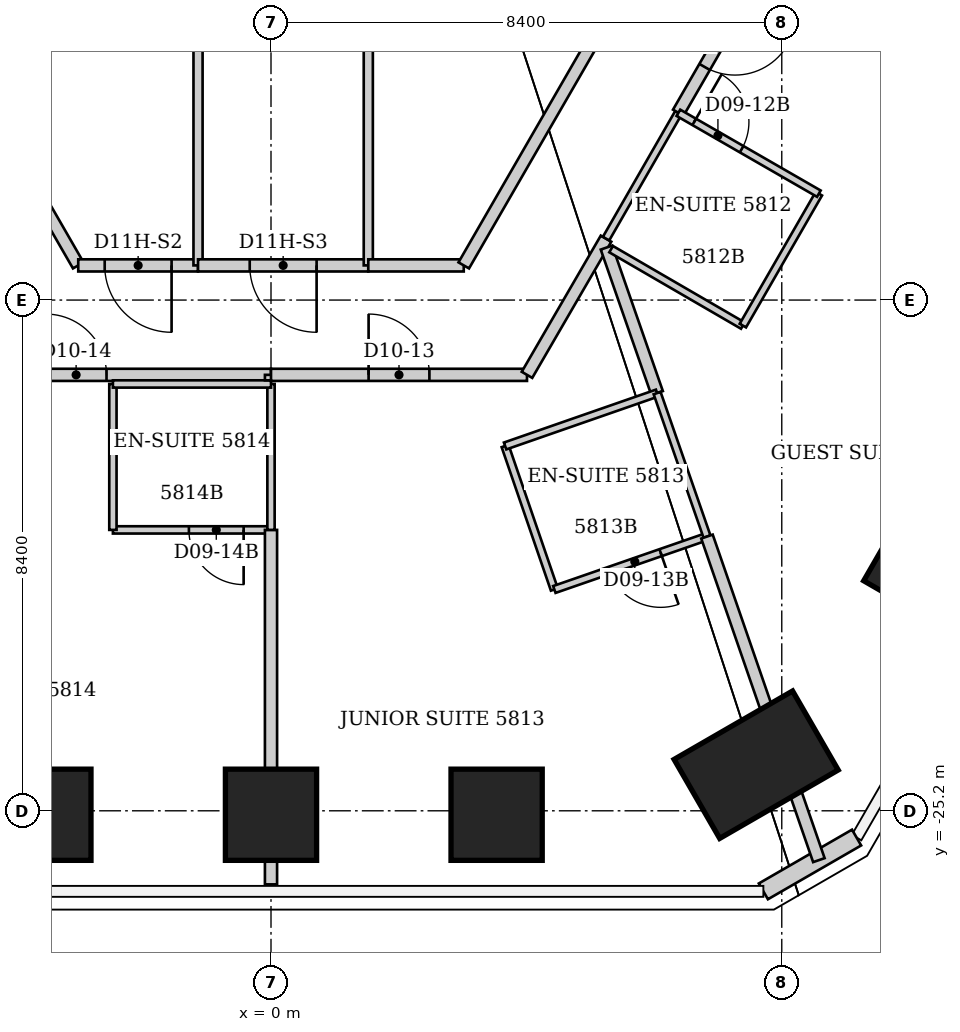
"""IFC4 building model, lengths in metres.
Left out: names, types, materials, properties, quantities, classifications, styles, units other than length and angle.
Written with IfcOpenShell. Run it as: python <this file> out.ifc"""

import sys

from ifc_helpers import new_model, si_unit, direction, frame, frame_2d, origin, origin_2d, place, context, subcontext, project, spatial, rectangle, extrude, element, fill, save


model = new_model("IFC4")
c1 = context("Model", 3, precision=1e-05, world=origin(), true_north=direction((0.0, 1.0)))
c2 = subcontext(c1, "Body", "Model", "MODEL_VIEW")
j1 = project(units=[si_unit("LENGTHUNIT", "METRE"), si_unit("PLANEANGLEUNIT", "RADIAN")], contexts=[c1])
p1 = place(None, origin())
s1 = spatial("IfcSite", under=j1, at=p1, CompositionType="ELEMENT")
p2 = place(p1, origin())
s2 = spatial("IfcBuilding", under=s1, at=p2, CompositionType="ELEMENT")
p3 = place(p2, frame((0.0, 0.0, 232.6)))
s3 = spatial("IfcBuildingStorey", under=s2, at=p3, CompositionType="ELEMENT", Elevation=232.6)
p4 = place(p3, frame((10.772, -21.142, -0.068), z_axis=(-0.029544009484, 0.057954133742, 0.997881991964), x_axis=(0.86581251094, -0.497389360855, 0.054520818106)))
e1 = element("IfcColumn", 1, at=p4, inside=s3, PredefinedType="COLUMN", context=c2, shape_type="SweptSolid", body=[
    extrude(rectangle(XDim=1.5, YDim=1.5, at=origin_2d()), origin(), (0.0, 0.0, 1.0), 3.876),
])
p5 = place(p3, frame((7.979, -24.442, -0.069), z_axis=(-0.022031779276, 0.067543140467, 0.997473069751), x_axis=(0.499490056896, -0.86352686909, 0.069505607122)))
e2 = element("IfcColumn", 2, at=p5, inside=s3, PredefinedType="COLUMN", context=c2, shape_type="SweptSolid", body=[
    extrude(rectangle(XDim=1.5, YDim=2.25, at=origin_2d()), origin(), (0.0, 0.0, 1.0), 3.878),
])
p6 = place(p3, frame((3.71, -25.265, -0.059), z_axis=(-0.010036196813, 0.068170393449, 0.997623211544), x_axis=(-0.000328953471, -0.99767362936, 0.068170529333)))
e3 = element("IfcColumn", 3, at=p6, inside=s3, PredefinedType="COLUMN", context=c2, shape_type="SweptSolid", body=[
    extrude(rectangle(XDim=1.5, YDim=1.5, at=origin_2d()), origin(), (0.0, 0.0, 1.0), 3.868),
])
p7 = place(p3, frame((0.0, -25.265, -0.051), z_axis=(0.0, 0.068181275472, 0.997672949255), x_axis=(0.0, -0.997672949255, 0.068181275472)))
e4 = element("IfcColumn", 4, at=p7, inside=s3, PredefinedType="COLUMN", context=c2, shape_type="SweptSolid", body=[
    extrude(rectangle(XDim=1.5, YDim=1.5, at=origin_2d()), origin(), (0.0, 0.0, 1.0), 3.86),
])
p8 = place(p3, frame((-3.71, -25.265, -0.059), z_axis=(0.010036196813, 0.068170393449, 0.997623211544), x_axis=(0.000328953471, -0.99767362936, 0.068170529333)))
e5 = element("IfcColumn", 5, at=p8, inside=s3, PredefinedType="COLUMN", context=c2, shape_type="SweptSolid", body=[
    extrude(rectangle(XDim=1.5, YDim=1.5, at=origin_2d()), origin(), (0.0, 0.0, 1.0), 3.868),
])
p9 = place(p3, frame((9.63, -25.64, 0.0), z_axis=(0.0, 0.0, 1.0), x_axis=(-0.866036293601, -0.499981137809, 0.0)))
e6 = element("IfcWall", 6, at=p9, inside=s3, PredefinedType="SOLIDWALL", context=c2, shape_type="SweptSolid", body=[
    extrude(rectangle(XDim=1.77, YDim=0.3, at=frame_2d((0.885, 0.0))), origin(), (0.0, 0.0, 1.0), 3.64),
])
p10 = place(p3, frame((-4.21, -18.03, 0.0), z_axis=(0.0, 0.0, 1.0), x_axis=(1.0, 0.0, 0.0)))
e7 = element("IfcWall", 7, at=p10, inside=s3, PredefinedType="PARTITIONING", context=c2, shape_type="SweptSolid", body=[
    extrude(rectangle(XDim=4.21, YDim=0.2, at=frame_2d((2.105, 0.0))), origin(), (0.0, 0.0, 1.0), 3.64),
])
p11 = place(p10, frame((0.505, 0.0, 0.0)))
e8 = element("IfcOpeningElement", 8, at=p11, cuts=e7, PredefinedType="OPENING", context=c2, shape_type="SweptSolid", body=[
    extrude(rectangle(XDim=1.0, YDim=2.13, at=frame_2d((0.5, 1.065))), frame((0.0, 0.1, 0.0), z_axis=(0.0, -1.0, 0.0), x_axis=(1.0, 0.0, 0.0)), (0.0, 0.0, 1.0), 0.2),
])
p12 = place(p3, frame((-3.17, -16.23, 0.0), z_axis=(0.0, 0.0, 1.0), x_axis=(-0.499425709803, 0.866356716594, 0.0)))
e9 = element("IfcWall", 9, at=p12, inside=s3, PredefinedType="PARTITIONING", context=c2, shape_type="SweptSolid", body=[
    extrude(rectangle(XDim=1.662, YDim=0.2, at=frame_2d((0.831, 0.0))), origin(), (0.0, 0.0, 1.0), 3.64),
])
p13 = place(p3, frame((-2.6, -20.58, 0.0), z_axis=(0.0, 0.0, 1.0), x_axis=(1.0, 0.0, 0.0)))
e10 = element("IfcWall", 10, at=p13, inside=s3, PredefinedType="PARTITIONING", context=c2, shape_type="SweptSolid", body=[
    extrude(rectangle(XDim=2.6, YDim=0.12, at=frame_2d((1.3, 0.0))), origin(), (0.0, 0.0, 1.0), 3.64),
])
p14 = place(p13, frame((1.25, 0.0, 0.0)))
e11 = element("IfcOpeningElement", 11, at=p14, cuts=e10, PredefinedType="OPENING", context=c2, shape_type="SweptSolid", body=[
    extrude(rectangle(XDim=0.9, YDim=2.03, at=frame_2d((0.45, 1.015))), frame((0.0, 0.06, 0.0), z_axis=(0.0, -1.0, 0.0), x_axis=(1.0, 0.0, 0.0)), (0.0, 0.0, 1.0), 0.12),
])
p15 = place(p3, frame((-2.6, -18.18, 0.0), z_axis=(0.0, 0.0, 1.0), x_axis=(0.0, -1.0, 0.0)))
e12 = element("IfcWall", 12, at=p15, inside=s3, PredefinedType="PARTITIONING", context=c2, shape_type="SweptSolid", body=[
    extrude(rectangle(XDim=2.4, YDim=0.12, at=frame_2d((1.2, 0.0))), origin(), (0.0, 0.0, 1.0), 3.64),
])
p16 = place(p3, frame((-1.2, -16.23, 0.0), z_axis=(0.0, 0.0, 1.0), x_axis=(-1.0, 0.0, 0.0)))
e13 = element("IfcWall", 13, at=p16, inside=s3, PredefinedType="PARTITIONING", context=c2, shape_type="SweptSolid", body=[
    extrude(rectangle(XDim=1.97, YDim=0.2, at=frame_2d((0.985, 0.0))), origin(), (0.0, 0.0, 1.0), 3.64),
])
p17 = place(p16, frame((0.435, 0.0, 0.0)))
e14 = element("IfcOpeningElement", 14, at=p17, cuts=e13, PredefinedType="OPENING", context=c2, shape_type="SweptSolid", body=[
    extrude(rectangle(XDim=1.1, YDim=2.2, at=frame_2d((0.55, 1.1))), frame((0.0, 0.1, 0.0), z_axis=(0.0, -1.0, 0.0), x_axis=(1.0, 0.0, 0.0)), (0.0, 0.0, 1.0), 0.2),
])
p18 = place(p3, frame((-1.2, -7.1, 0.0), z_axis=(0.0, 0.0, 1.0), x_axis=(0.0, -1.0, 0.0)))
e15 = element("IfcWall", 15, at=p18, inside=s3, PredefinedType="PARTITIONING", context=c2, shape_type="SweptSolid", body=[
    extrude(rectangle(XDim=9.13, YDim=0.15, at=frame_2d((4.565, 0.0))), origin(), (0.0, 0.0, 1.0), 3.64),
])
p19 = place(p3, frame((0.0, -26.41, 0.0), z_axis=(0.0, 0.0, 1.0), x_axis=(0.0, 1.0, 0.0)))
e16 = element("IfcWall", 16, at=p19, inside=s3, PredefinedType="PARTITIONING", context=c2, shape_type="SweptSolid", body=[
    extrude(rectangle(XDim=5.83, YDim=0.2, at=frame_2d((2.915, 0.0))), origin(), (0.0, 0.0, 1.0), 2.726),
])
p20 = place(p3, frame((0.0, -20.58, 0.0), z_axis=(0.0, 0.0, 1.0), x_axis=(0.0, 1.0, 0.0)))
e17 = element("IfcWall", 17, at=p20, inside=s3, PredefinedType="PARTITIONING", context=c2, shape_type="SweptSolid", body=[
    extrude(rectangle(XDim=2.4, YDim=0.12, at=frame_2d((1.2, 0.0))), origin(), (0.0, 0.0, 1.0), 2.726),
])
p21 = place(p3, frame((0.0, -18.18, 0.0), z_axis=(0.0, 0.0, 1.0), x_axis=(-1.0, 0.0, 0.0)))
e18 = element("IfcWall", 18, at=p21, inside=s3, PredefinedType="PARTITIONING", context=c2, shape_type="SweptSolid", body=[
    extrude(rectangle(XDim=2.6, YDim=0.12, at=frame_2d((1.3, 0.0))), origin(), (0.0, 0.0, 1.0), 3.64),
])
p22 = place(p3, frame((0.0, -18.12, 0.0), z_axis=(0.0, 0.0, 1.0), x_axis=(0.0, 1.0, 0.0)))
e19 = element("IfcWall", 19, at=p22, inside=s3, PredefinedType="PARTITIONING", context=c2, shape_type="SweptSolid", body=[
    extrude(rectangle(XDim=0.09, YDim=0.2, at=frame_2d((0.045, 0.0))), origin(), (0.0, 0.0, 1.0), 3.64),
])
p23 = place(p3, frame((0.0, -18.03, 0.0), z_axis=(0.0, 0.0, 1.0), x_axis=(1.0, 0.0, 0.0)))
e20 = element("IfcWall", 20, at=p23, inside=s3, PredefinedType="PARTITIONING", context=c2, shape_type="SweptSolid", body=[
    extrude(rectangle(XDim=4.21, YDim=0.2, at=frame_2d((2.105, 0.0))), origin(), (0.0, 0.0, 1.0), 3.64),
])
p24 = place(p23, frame((1.605, 0.0, 0.0)))
e21 = element("IfcOpeningElement", 21, at=p24, cuts=e20, PredefinedType="OPENING", context=c2, shape_type="SweptSolid", body=[
    extrude(rectangle(XDim=1.0, YDim=2.13, at=frame_2d((0.5, 1.065))), frame((0.0, 0.1, 0.0), z_axis=(0.0, -1.0, 0.0), x_axis=(1.0, 0.0, 0.0)), (0.0, 0.0, 1.0), 0.2),
])
p25 = place(p3, frame((1.6, -16.23, 0.0), z_axis=(0.0, 0.0, 1.0), x_axis=(-1.0, 0.0, 0.0)))
e22 = element("IfcWall", 22, at=p25, inside=s3, PredefinedType="PARTITIONING", context=c2, shape_type="SweptSolid", body=[
    extrude(rectangle(XDim=2.8, YDim=0.2, at=frame_2d((1.4, 0.0))), origin(), (0.0, 0.0, 1.0), 3.64),
])
p26 = place(p25, frame((0.85, 0.0, 0.0)))
e23 = element("IfcOpeningElement", 23, at=p26, cuts=e22, PredefinedType="OPENING", context=c2, shape_type="SweptSolid", body=[
    extrude(rectangle(XDim=1.1, YDim=2.2, at=frame_2d((0.55, 1.1))), frame((0.0, 0.1, 0.0), z_axis=(0.0, -1.0, 0.0), x_axis=(1.0, 0.0, 0.0)), (0.0, 0.0, 1.0), 0.2),
])
p27 = place(p3, frame((1.6, -7.1, 0.0), z_axis=(0.0, 0.0, 1.0), x_axis=(0.0, -1.0, 0.0)))
e24 = element("IfcWall", 24, at=p27, inside=s3, PredefinedType="PARTITIONING", context=c2, shape_type="SweptSolid", body=[
    extrude(rectangle(XDim=9.13, YDim=0.15, at=frame_2d((4.565, 0.0))), origin(), (0.0, 0.0, 1.0), 3.64),
])
p28 = place(p3, frame((3.17, -16.23, 0.0), z_axis=(0.0, 0.0, 1.0), x_axis=(-1.0, 0.0, 0.0)))
e25 = element("IfcWall", 25, at=p28, inside=s3, PredefinedType="PARTITIONING", context=c2, shape_type="SweptSolid", body=[
    extrude(rectangle(XDim=1.57, YDim=0.2, at=frame_2d((0.785, 0.0))), origin(), (0.0, 0.0, 1.0), 3.64),
])
p29 = place(p3, frame((3.85, -19.2, 0.0), z_axis=(0.0, 0.0, 1.0), x_axis=(0.324551952924, -0.945867871245, 0.0)))
e26 = element("IfcWall", 26, at=p29, inside=s3, PredefinedType="PARTITIONING", context=c2, shape_type="SweptSolid", body=[
    extrude(rectangle(XDim=2.495, YDim=0.12, at=frame_2d((1.248, 0.0))), origin(), (0.0, 0.0, 1.0), 3.64),
])
p30 = place(p3, frame((4.66, -21.56, 0.0), z_axis=(0.0, 0.0, 1.0), x_axis=(0.944838473769, 0.327536652126, 0.0)))
e27 = element("IfcWall", 27, at=p30, inside=s3, PredefinedType="PARTITIONING", context=c2, shape_type="SweptSolid", body=[
    extrude(rectangle(XDim=2.656, YDim=0.12, at=frame_2d((1.328, 0.0))), origin(), (0.0, 0.0, 1.0), 3.64),
])
p31 = place(p30, frame((0.95, 0.0, 0.0)))
e28 = element("IfcOpeningElement", 28, at=p31, cuts=e27, PredefinedType="OPENING", context=c2, shape_type="SweptSolid", body=[
    extrude(rectangle(XDim=0.9, YDim=2.03, at=frame_2d((0.45, 1.015))), frame((0.0, 0.06, 0.0), z_axis=(0.0, -1.0, 0.0), x_axis=(1.0, 0.0, 0.0)), (0.0, 0.0, 1.0), 0.12),
])
p32 = place(p3, frame((5.51, -15.79, 0.0), z_axis=(0.0, 0.0, 1.0), x_axis=(-0.501964949025, -0.864887963814, 0.0)))
e29 = element("IfcWall", 29, at=p32, inside=s3, PredefinedType="PARTITIONING", context=c2, shape_type="SweptSolid", body=[
    extrude(rectangle(XDim=2.59, YDim=0.2, at=frame_2d((1.295, 0.0))), origin(), (0.0, 0.0, 1.0), 3.64),
])
p33 = place(p3, frame((5.51, -15.79, 0.0), z_axis=(0.0, 0.0, 1.0), x_axis=(0.49836161924, 0.866969259241, 0.0)))
e30 = element("IfcWall", 30, at=p33, inside=s3, PredefinedType="PARTITIONING", context=c2, shape_type="SweptSolid", body=[
    extrude(rectangle(XDim=2.388, YDim=0.12, at=frame_2d((1.194, 0.0))), origin(), (0.0, 0.0, 1.0), 3.64),
])
p34 = place(p3, frame((5.517, -15.937, 0.0), z_axis=(0.0, 0.0, 1.0), x_axis=(0.328714924291, -0.944429191919, 0.0)))
e31 = element("IfcWall", 31, at=p34, inside=s3, PredefinedType="PARTITIONING", context=c2, shape_type="SweptSolid", body=[
    extrude(rectangle(XDim=2.534, YDim=0.2, at=frame_2d((1.267, 0.0))), origin(), (0.0, 0.0, 1.0), 3.64),
])
p35 = place(p3, frame((5.594, -15.963, 0.0), z_axis=(0.0, 0.0, 1.0), x_axis=(0.864900876675, -0.501942699445, 0.0)))
e32 = element("IfcWall", 32, at=p35, inside=s3, PredefinedType="PARTITIONING", context=c2, shape_type="SweptSolid", body=[
    extrude(rectangle(XDim=2.505, YDim=0.12, at=frame_2d((1.252, 0.0))), origin(), (0.0, 0.0, 1.0), 3.038),
])
p36 = place(p3, frame((6.35, -18.33, 0.0), z_axis=(0.0, 0.0, 1.0), x_axis=(-0.944470666048, -0.328595740956, 0.0)))
e33 = element("IfcWall", 33, at=p36, inside=s3, PredefinedType="PARTITIONING", context=c2, shape_type="SweptSolid", body=[
    extrude(rectangle(XDim=2.647, YDim=0.12, at=frame_2d((1.324, 0.0))), origin(), (0.0, 0.0, 1.0), 3.64),
])
p37 = place(p3, frame((6.35, -18.33, 0.0), z_axis=(0.0, 0.0, 1.0), x_axis=(0.328164304993, -0.944620658745, 0.0)))
e34 = element("IfcWall", 34, at=p37, inside=s3, PredefinedType="PARTITIONING", context=c2, shape_type="SweptSolid", body=[
    extrude(rectangle(XDim=2.498, YDim=0.12, at=frame_2d((1.249, 0.0))), origin(), (0.0, 0.0, 1.0), 3.64),
])
p38 = place(p3, frame((7.17, -20.69, 0.0), z_axis=(0.0, 0.0, 1.0), x_axis=(0.326821657676, -0.945086029985, 0.0)))
e35 = element("IfcWall", 35, at=p38, inside=s3, PredefinedType="PARTITIONING", context=c2, shape_type="SweptSolid", body=[
    extrude(rectangle(XDim=5.631, YDim=0.2, at=frame_2d((2.815, 0.0))), origin(), (0.0, 0.0, 1.0), 3.64),
])
p39 = place(p3, frame((7.76, -17.22, 0.0), z_axis=(0.0, 0.0, 1.0), x_axis=(0.499159685399, 0.866510016372, 0.0)))
e36 = element("IfcWall", 36, at=p39, inside=s3, PredefinedType="PARTITIONING", context=c2, shape_type="SweptSolid", body=[
    extrude(rectangle(XDim=2.504, YDim=0.12, at=frame_2d((1.252, 0.0))), origin(), (0.0, 0.0, 1.0), 3.64),
])
p40 = place(p3, frame((8.065, -11.347, 0.0), z_axis=(0.0, 0.0, 1.0), x_axis=(-0.499611785355, -0.866249423627, 0.0)))
e37 = element("IfcWall", 37, at=p40, inside=s3, PredefinedType="PARTITIONING", context=c2, shape_type="SweptSolid", body=[
    extrude(rectangle(XDim=2.738, YDim=0.2, at=frame_2d((1.369, 0.0))), origin(), (0.0, 0.0, 1.0), 3.64),
])
p41 = place(p40, frame((0.869, 0.0, 0.0)))
e38 = element("IfcOpeningElement", 38, at=p41, cuts=e37, PredefinedType="OPENING", context=c2, shape_type="SweptSolid", body=[
    extrude(rectangle(XDim=1.0, YDim=2.13, at=frame_2d((0.5, 1.065))), frame((0.0, 0.1, 0.0), z_axis=(0.0, -1.0, 0.0), x_axis=(1.0, 0.0, 0.0)), (0.0, 0.0, 1.0), 0.2),
])
p42 = place(p3, frame((8.07, -11.35, 0.0), z_axis=(0.0, 0.0, 1.0), x_axis=(0.865006586495, -0.501760505939, 0.0)))
e39 = element("IfcWall", 39, at=p42, inside=s3, PredefinedType="PARTITIONING", context=c2, shape_type="SweptSolid", body=[
    extrude(rectangle(XDim=2.67, YDim=0.12, at=frame_2d((1.335, 0.0))), origin(), (0.0, 0.0, 1.0), 3.64),
])
p43 = place(p3, frame((8.41, -7.15, 0.0), z_axis=(0.0, 0.0, 1.0), x_axis=(-0.499828628176, -0.866124322748, 0.0)))
e40 = element("IfcWall", 40, at=p43, inside=s3, PredefinedType="PARTITIONING", context=c2, shape_type="SweptSolid", body=[
    extrude(rectangle(XDim=10.484, YDim=0.2, at=frame_2d((5.242, 0.0))), origin(), (0.0, 0.0, 1.0), 3.64),
])
p44 = place(p43, frame((4.692, 0.0, 0.0)))
e41 = element("IfcOpeningElement", 41, at=p44, cuts=e40, PredefinedType="OPENING", context=c2, shape_type="SweptSolid", body=[
    extrude(rectangle(XDim=1.1, YDim=2.2, at=frame_2d((0.55, 1.1))), frame((0.0, 0.1, 0.0), z_axis=(0.0, -1.0, 0.0), x_axis=(1.0, 0.0, 0.0)), (0.0, 0.0, 1.0), 0.2),
])
p45 = place(p3, frame((9.01, -15.05, 0.0), z_axis=(0.0, 0.0, 1.0), x_axis=(-0.866615255992, 0.498976951453, 0.0)))
e42 = element("IfcWall", 42, at=p45, inside=s3, PredefinedType="PARTITIONING", context=c2, shape_type="SweptSolid", body=[
    extrude(rectangle(XDim=2.666, YDim=0.12, at=frame_2d((1.333, 0.0))), origin(), (0.0, 0.0, 1.0), 3.64),
])
p46 = place(p45, frame((1.466, 0.0, 0.0)))
e43 = element("IfcOpeningElement", 43, at=p46, cuts=e42, PredefinedType="OPENING", context=c2, shape_type="SweptSolid", body=[
    extrude(rectangle(XDim=0.9, YDim=2.03, at=frame_2d((0.45, 1.015))), frame((0.0, 0.06, 0.0), z_axis=(0.0, -1.0, 0.0), x_axis=(1.0, 0.0, 0.0)), (0.0, 0.0, 1.0), 0.12),
])
p47 = place(p41, origin())
e44 = element("IfcDoor", 44, at=p47, inside=s3, OperationType="SINGLE_SWING_LEFT", PredefinedType="DOOR", context=c2, shape_type="SweptSolid", body=[
    extrude(rectangle(XDim=1.0, YDim=2.13, at=frame_2d((0.5, 1.065))), frame((0.0, 0.025, 0.0), z_axis=(0.0, -1.0, 0.0), x_axis=(1.0, 0.0, 0.0)), (0.0, 0.0, 1.0), 0.05),
])
fill(e38, e44)
p48 = place(p46, origin())
e45 = element("IfcDoor", 45, at=p48, inside=s3, OperationType="SINGLE_SWING_RIGHT", PredefinedType="DOOR", context=c2, shape_type="SweptSolid", body=[
    extrude(rectangle(XDim=0.9, YDim=2.03, at=frame_2d((0.45, 1.015))), frame((0.0, 0.025, 0.0), z_axis=(0.0, -1.0, 0.0), x_axis=(1.0, 0.0, 0.0)), (0.0, 0.0, 1.0), 0.05),
])
fill(e43, e45)
p49 = place(p24, origin())
e46 = element("IfcDoor", 46, at=p49, inside=s3, OperationType="SINGLE_SWING_LEFT", PredefinedType="DOOR", context=c2, shape_type="SweptSolid", body=[
    extrude(rectangle(XDim=1.0, YDim=2.13, at=frame_2d((0.5, 1.065))), frame((0.0, 0.025, 0.0), z_axis=(0.0, -1.0, 0.0), x_axis=(1.0, 0.0, 0.0)), (0.0, 0.0, 1.0), 0.05),
])
fill(e21, e46)
p50 = place(p31, origin())
e47 = element("IfcDoor", 47, at=p50, inside=s3, OperationType="SINGLE_SWING_RIGHT", PredefinedType="DOOR", context=c2, shape_type="SweptSolid", body=[
    extrude(rectangle(XDim=0.9, YDim=2.03, at=frame_2d((0.45, 1.015))), frame((0.0, 0.025, 0.0), z_axis=(0.0, -1.0, 0.0), x_axis=(1.0, 0.0, 0.0)), (0.0, 0.0, 1.0), 0.05),
])
fill(e28, e47)
p51 = place(p11, origin())
e48 = element("IfcDoor", 48, at=p51, inside=s3, OperationType="SINGLE_SWING_LEFT", PredefinedType="DOOR", context=c2, shape_type="SweptSolid", body=[
    extrude(rectangle(XDim=1.0, YDim=2.13, at=frame_2d((0.5, 1.065))), frame((0.0, 0.025, 0.0), z_axis=(0.0, -1.0, 0.0), x_axis=(1.0, 0.0, 0.0)), (0.0, 0.0, 1.0), 0.05),
])
fill(e8, e48)
p52 = place(p14, origin())
e49 = element("IfcDoor", 49, at=p52, inside=s3, OperationType="SINGLE_SWING_RIGHT", PredefinedType="DOOR", context=c2, shape_type="SweptSolid", body=[
    extrude(rectangle(XDim=0.9, YDim=2.03, at=frame_2d((0.45, 1.015))), frame((0.0, 0.025, 0.0), z_axis=(0.0, -1.0, 0.0), x_axis=(1.0, 0.0, 0.0)), (0.0, 0.0, 1.0), 0.05),
])
fill(e11, e49)
p53 = place(p17, origin())
e50 = element("IfcDoor", 50, at=p53, inside=s3, OperationType="SINGLE_SWING_LEFT", PredefinedType="DOOR", context=c2, shape_type="SweptSolid", body=[
    extrude(rectangle(XDim=1.1, YDim=2.2, at=frame_2d((0.55, 1.1))), frame((0.0, 0.025, 0.0), z_axis=(0.0, -1.0, 0.0), x_axis=(1.0, 0.0, 0.0)), (0.0, 0.0, 1.0), 0.05),
])
fill(e14, e50)
p54 = place(p26, origin())
e51 = element("IfcDoor", 51, at=p54, inside=s3, OperationType="SINGLE_SWING_LEFT", PredefinedType="DOOR", context=c2, shape_type="SweptSolid", body=[
    extrude(rectangle(XDim=1.1, YDim=2.2, at=frame_2d((0.55, 1.1))), frame((0.0, 0.025, 0.0), z_axis=(0.0, -1.0, 0.0), x_axis=(1.0, 0.0, 0.0)), (0.0, 0.0, 1.0), 0.05),
])
fill(e23, e51)
save(model, sys.argv[1])
